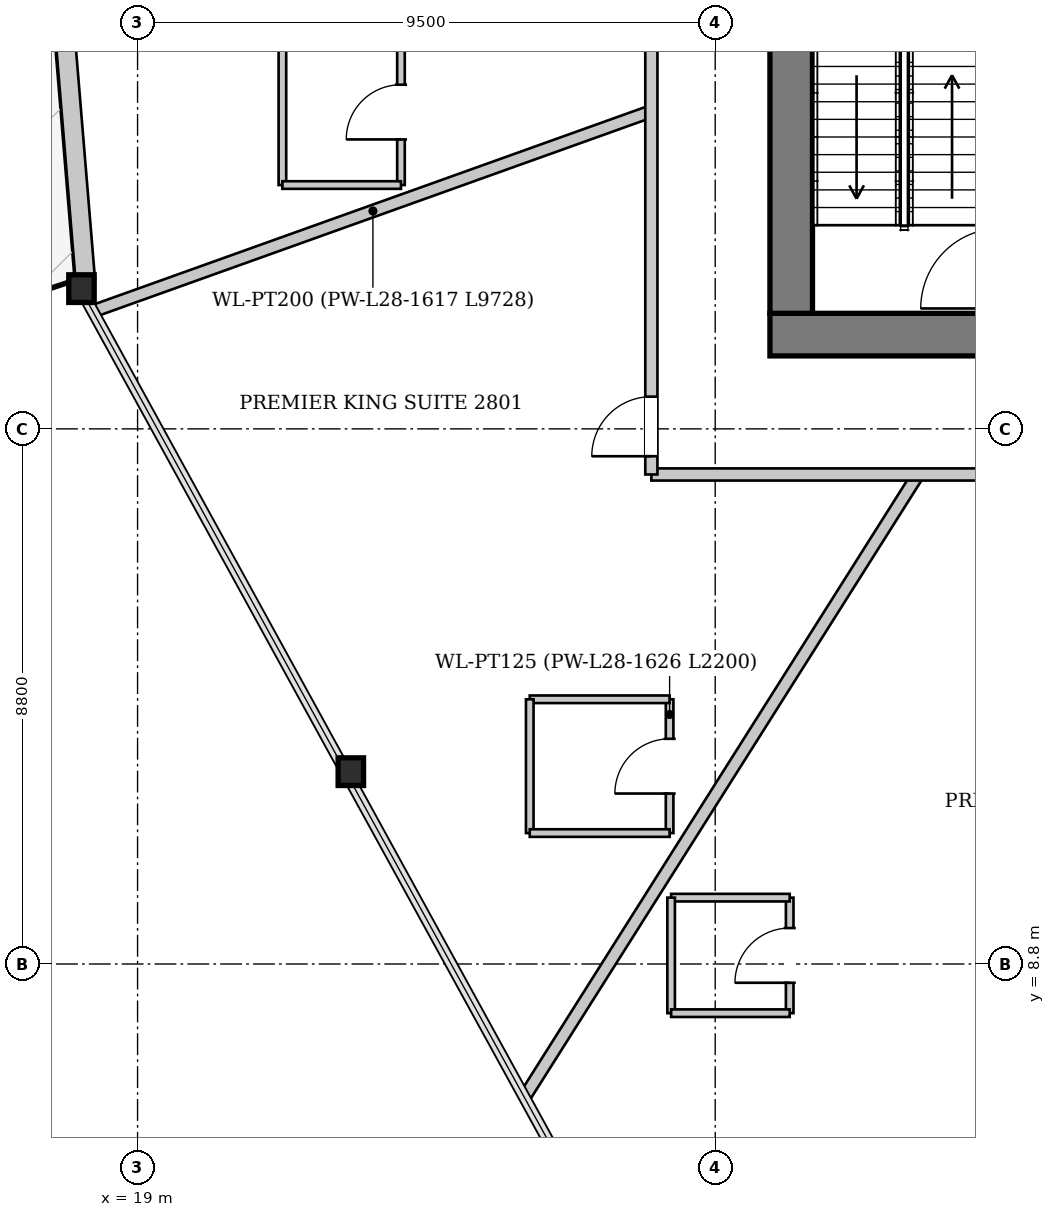
"""IFC4 building model, lengths in metres.
Left out: names, types, materials, properties, quantities, classifications, styles, units other than length and angle.
Written with IfcOpenShell. Run it as: python <this file> out.ifc"""

import sys

from ifc_helpers import new_model, si_unit, direction, frame, frame_2d, origin, origin_2d, place, context, subcontext, project, spatial, rectangle, i_section, extrude, source, transform, mapped, element, fill, save


model = new_model("IFC4")
c1 = context("Model", 3, precision=1e-05, world=origin(), true_north=direction((0.0, 1.0)))
c2 = subcontext(c1, "Body", "Model", "MODEL_VIEW")
j1 = project(units=[si_unit("LENGTHUNIT", "METRE"), si_unit("PLANEANGLEUNIT", "RADIAN")], contexts=[c1])
p1 = place(None, origin())
s1 = spatial("IfcSite", under=j1, at=p1, CompositionType="ELEMENT")
p2 = place(p1, origin())
s2 = spatial("IfcBuilding", under=s1, at=p2, CompositionType="ELEMENT")
p3 = place(p2, frame((0.0, 0.0, 109.25)))
s3 = spatial("IfcBuildingStorey", under=s2, at=p3, CompositionType="ELEMENT", Elevation=109.25)
m1 = source(origin(), c2, "Body", "SweptSolid", [
    extrude(i_section(OverallWidth=0.418, OverallDepth=0.455, WebThickness=0.038, FlangeThickness=0.059, at=origin_2d()), origin(), (0.0, 0.0, 1.0), 3.403),
])
p4 = place(p3, frame((17.98, 20.048, 0.0), z_axis=(0.057259482904, -0.083449597264, 0.994865577017), x_axis=(0.824558750738, 0.565776339715, 0.0)))
e1 = element("IfcColumn", 1, at=p4, inside=s3, PredefinedType="COLUMN", context=c2, shape_type="MappedRepresentation", body=[
    mapped(m1, transform((0.0, 0.0, 0.0), x_axis=(1.0, 0.0, 0.0), y_axis=(0.0, 1.0, 0.0), z_axis=(0.0, 0.0, 1.0), scale=1.0)),
])
m2 = source(origin(), c2, "Body", "SweptSolid", [
    extrude(i_section(OverallWidth=0.418, OverallDepth=0.455, WebThickness=0.038, FlangeThickness=0.059, at=origin_2d()), origin(), (0.0, 0.0, 1.0), 3.405),
])
p5 = place(p3, frame((22.361, 12.071, 0.0), z_axis=(0.086336223989, -0.063676550583, 0.994229024588), x_axis=(0.593563792258, 0.804786943557, 0.0)))
e2 = element("IfcColumn", 2, at=p5, inside=s3, PredefinedType="COLUMN", context=c2, shape_type="MappedRepresentation", body=[
    mapped(m2, transform((0.0, 0.0, 0.0), x_axis=(1.0, 0.0, 0.0), y_axis=(0.0, 1.0, 0.0), z_axis=(0.0, 0.0, 1.0), scale=1.0)),
])
p6 = place(p3, frame((51.917, 15.746, 0.0), z_axis=(0.0, 0.0, 1.0), x_axis=(-0.841105279502, -0.540871434626, 0.0)))
e3 = element("IfcWall", 3, at=p6, inside=s3, PredefinedType="SOLIDWALL", context=c2, shape_type="SweptSolid", body=[
    extrude(rectangle(XDim=23.953, YDim=0.32, at=frame_2d((11.976, 0.0))), origin(), (0.0, 0.0, 1.0), 2.692),
])
p7 = place(p6, frame((7.115, 0.0, 0.0)))
e4 = element("IfcOpeningElement", 4, at=p7, cuts=e3, PredefinedType="OPENING", context=c2, shape_type="SweptSolid", body=[
    extrude(rectangle(XDim=1.1, YDim=2.3, at=frame_2d((0.55, 1.15))), frame((0.0, 0.17, 0.0), z_axis=(0.0, -1.0, 0.0), x_axis=(1.0, 0.0, 0.0)), (0.0, 0.0, 1.0), 0.34),
])
p8 = place(p6, frame((16.825, 0.0, 0.372)))
e5 = element("IfcOpeningElement", 5, at=p8, cuts=e3, PredefinedType="OPENING", context=c2, shape_type="SweptSolid", body=[
    extrude(rectangle(XDim=1.8, YDim=2.2, at=frame_2d((0.9, 1.1))), frame((0.0, 0.17, 0.0), z_axis=(0.0, -1.0, 0.0), x_axis=(1.0, 0.0, 0.0)), (0.0, 0.0, 1.0), 0.34),
])
p9 = place(p3, frame((18.139, 20.062, 0.0), z_axis=(0.0, 0.0, 1.0), x_axis=(-0.082462696948, 0.996594151905, 0.0)))
e6 = element("IfcWall", 6, at=p9, inside=s3, PredefinedType="SOLIDWALL", context=c2, shape_type="SweptSolid", body=[
    extrude(rectangle(XDim=18.202, YDim=0.32, at=frame_2d((9.101, 0.0))), origin(), (0.0, 0.0, 1.0), 2.692),
])
p10 = place(p9, frame((5.275, 0.0, 0.0)))
e7 = element("IfcOpeningElement", 7, at=p10, cuts=e6, PredefinedType="OPENING", context=c2, shape_type="SweptSolid", body=[
    extrude(rectangle(XDim=1.1, YDim=2.3, at=frame_2d((0.55, 1.15))), frame((0.0, 0.17, 0.0), z_axis=(0.0, -1.0, 0.0), x_axis=(1.0, 0.0, 0.0)), (0.0, 0.0, 1.0), 0.34),
])
p11 = place(p9, frame((12.569, 0.0, 0.372)))
e8 = element("IfcOpeningElement", 8, at=p11, cuts=e6, PredefinedType="OPENING", context=c2, shape_type="SweptSolid", body=[
    extrude(rectangle(XDim=1.8, YDim=2.2, at=frame_2d((0.9, 1.1))), frame((0.0, 0.17, 0.0), z_axis=(0.0, -1.0, 0.0), x_axis=(1.0, 0.0, 0.0)), (0.0, 0.0, 1.0), 0.34),
])
p12 = place(p3, frame((46.6, 19.15, 0.0), z_axis=(0.0, 0.0, 1.0), x_axis=(-1.0, 0.0, 0.0)))
e9 = element("IfcWall", 9, at=p12, inside=s3, PredefinedType="SHEAR", context=c2, shape_type="SweptSolid", body=[
    extrude(rectangle(XDim=17.2, YDim=0.7, at=frame_2d((8.6, 0.0))), origin(), (0.0, 0.0, 1.0), 3.3),
])
p13 = place(p12, frame((4.8, 0.0, 0.0)))
e10 = element("IfcOpeningElement", 10, at=p13, cuts=e9, PredefinedType="OPENING", context=c2, shape_type="SweptSolid", body=[
    extrude(rectangle(XDim=1.12, YDim=2.25, at=frame_2d((0.56, 1.125))), frame((0.0, 0.36, 0.0), z_axis=(0.0, -1.0, 0.0), x_axis=(1.0, 0.0, 0.0)), (0.0, 0.0, 1.0), 0.72),
])
p14 = place(p12, frame((11.3, 0.0, 0.0)))
e11 = element("IfcOpeningElement", 11, at=p14, cuts=e9, PredefinedType="OPENING", context=c2, shape_type="SweptSolid", body=[
    extrude(rectangle(XDim=1.12, YDim=2.25, at=frame_2d((0.56, 1.125))), frame((0.0, 0.36, 0.0), z_axis=(0.0, -1.0, 0.0), x_axis=(1.0, 0.0, 0.0)), (0.0, 0.0, 1.0), 0.72),
])
p15 = place(p3, frame((29.75, 19.5, 0.0), z_axis=(0.0, 0.0, 1.0), x_axis=(0.0, 1.0, 0.0)))
e12 = element("IfcWall", 12, at=p15, inside=s3, PredefinedType="SHEAR", context=c2, shape_type="SweptSolid", body=[
    extrude(rectangle(XDim=14.2, YDim=0.7, at=frame_2d((7.1, 0.0))), origin(), (0.0, 0.0, 1.0), 3.3),
])
p16 = place(p15, frame((7.42, 0.0, 0.0)))
e13 = element("IfcOpeningElement", 13, at=p16, cuts=e12, PredefinedType="OPENING", context=c2, shape_type="SweptSolid", body=[
    extrude(rectangle(XDim=1.6, YDim=2.2, at=frame_2d((0.8, 1.1))), frame((0.0, 0.36, 0.0), z_axis=(0.0, -1.0, 0.0), x_axis=(1.0, 0.0, 0.0)), (0.0, 0.0, 1.0), 0.72),
])
p17 = place(p3, frame((27.45, 22.823, 0.0), z_axis=(0.0, 0.0, 1.0), x_axis=(-0.941467347451, -0.337104188174, 0.0)))
e14 = element("IfcWall", 14, at=p17, inside=s3, PredefinedType="PARTITIONING", context=c2, shape_type="SweptSolid", body=[
    extrude(rectangle(XDim=9.728, YDim=0.2, at=frame_2d((4.864, 0.0))), origin(), (0.0, 0.0, 1.0), 2.785),
])
p18 = place(p3, frame((31.836, 16.85, 0.0), z_axis=(0.0, 0.0, 1.0), x_axis=(-0.534334254855, -0.845273271841, 0.0)))
e15 = element("IfcWall", 15, at=p18, inside=s3, PredefinedType="PARTITIONING", context=c2, shape_type="SweptSolid", body=[
    extrude(rectangle(XDim=12.084, YDim=0.2, at=frame_2d((6.042, 0.0))), origin(), (0.0, 0.0, 1.0), 3.3),
])
p19 = place(p3, frame((27.75, 10.953, 0.0), z_axis=(0.0, 0.0, 1.0), x_axis=(0.0, 1.0, 0.0)))
e16 = element("IfcWall", 16, at=p19, inside=s3, PredefinedType="PARTITIONING", context=c2, shape_type="SweptSolid", body=[
    extrude(rectangle(XDim=2.2, YDim=0.125, at=frame_2d((1.1, 0.0))), origin(), (0.0, 0.0, 1.0), 3.3),
])
p20 = place(p19, frame((0.65, 0.0, 0.0)))
e17 = element("IfcOpeningElement", 17, at=p20, cuts=e16, PredefinedType="OPENING", context=c2, shape_type="SweptSolid", body=[
    extrude(rectangle(XDim=0.9, YDim=2.1, at=frame_2d((0.45, 1.05))), frame((0.0, 0.073, 0.0), z_axis=(0.0, -1.0, 0.0), x_axis=(1.0, 0.0, 0.0)), (0.0, 0.0, 1.0), 0.145),
])
p21 = place(p3, frame((27.75, 13.153, 0.0), z_axis=(0.0, 0.0, 1.0), x_axis=(-1.0, 0.0, 0.0)))
e18 = element("IfcWall", 18, at=p21, inside=s3, PredefinedType="PARTITIONING", context=c2, shape_type="SweptSolid", body=[
    extrude(rectangle(XDim=2.3, YDim=0.125, at=frame_2d((1.15, 0.0))), origin(), (0.0, 0.0, 1.0), 3.3),
])
p22 = place(p3, frame((25.45, 13.153, 0.0), z_axis=(0.0, 0.0, 1.0), x_axis=(0.0, -1.0, 0.0)))
e19 = element("IfcWall", 19, at=p22, inside=s3, PredefinedType="PARTITIONING", context=c2, shape_type="SweptSolid", body=[
    extrude(rectangle(XDim=2.2, YDim=0.125, at=frame_2d((1.1, 0.0))), origin(), (0.0, 0.0, 1.0), 3.3),
])
p23 = place(p3, frame((25.45, 10.953, 0.0), z_axis=(0.0, 0.0, 1.0), x_axis=(1.0, 0.0, 0.0)))
e20 = element("IfcWall", 20, at=p23, inside=s3, PredefinedType="PARTITIONING", context=c2, shape_type="SweptSolid", body=[
    extrude(rectangle(XDim=2.3, YDim=0.125, at=frame_2d((1.15, 0.0))), origin(), (0.0, 0.0, 1.0), 3.3),
])
p24 = place(p3, frame((29.725, 7.991, 0.0), z_axis=(0.0, 0.0, 1.0), x_axis=(0.0, 1.0, 0.0)))
e21 = element("IfcWall", 21, at=p24, inside=s3, PredefinedType="PARTITIONING", context=c2, shape_type="SweptSolid", body=[
    extrude(rectangle(XDim=1.9, YDim=0.125, at=frame_2d((0.95, 0.0))), origin(), (0.0, 0.0, 1.0), 2.795),
])
p25 = place(p24, frame((0.5, 0.0, 0.0)))
e22 = element("IfcOpeningElement", 22, at=p25, cuts=e21, PredefinedType="OPENING", context=c2, shape_type="SweptSolid", body=[
    extrude(rectangle(XDim=0.9, YDim=2.1, at=frame_2d((0.45, 1.05))), frame((0.0, 0.073, 0.0), z_axis=(0.0, -1.0, 0.0), x_axis=(1.0, 0.0, 0.0)), (0.0, 0.0, 1.0), 0.145),
])
p26 = place(p3, frame((29.725, 9.891, 0.0), z_axis=(0.0, 0.0, 1.0), x_axis=(-1.0, 0.0, 0.0)))
e23 = element("IfcWall", 23, at=p26, inside=s3, PredefinedType="PARTITIONING", context=c2, shape_type="SweptSolid", body=[
    extrude(rectangle(XDim=1.95, YDim=0.125, at=frame_2d((0.975, 0.0))), origin(), (0.0, 0.0, 1.0), 3.3),
])
p27 = place(p3, frame((27.775, 9.891, 0.0), z_axis=(0.0, 0.0, 1.0), x_axis=(0.0, -1.0, 0.0)))
e24 = element("IfcWall", 24, at=p27, inside=s3, PredefinedType="PARTITIONING", context=c2, shape_type="SweptSolid", body=[
    extrude(rectangle(XDim=1.9, YDim=0.125, at=frame_2d((0.95, 0.0))), origin(), (0.0, 0.0, 1.0), 3.3),
])
p28 = place(p3, frame((27.775, 7.991, 0.0), z_axis=(0.0, 0.0, 1.0), x_axis=(1.0, 0.0, 0.0)))
e25 = element("IfcWall", 25, at=p28, inside=s3, PredefinedType="PARTITIONING", context=c2, shape_type="SweptSolid", body=[
    extrude(rectangle(XDim=1.95, YDim=0.125, at=frame_2d((0.975, 0.0))), origin(), (0.0, 0.0, 1.0), 3.3),
])
p29 = place(p3, frame((23.332, 21.61, 0.0), z_axis=(0.0, 0.0, 1.0), x_axis=(0.0, 1.0, 0.0)))
e26 = element("IfcWall", 26, at=p29, inside=s3, PredefinedType="PARTITIONING", context=c2, shape_type="SweptSolid", body=[
    extrude(rectangle(XDim=2.4, YDim=0.125, at=frame_2d((1.2, 0.0))), origin(), (0.0, 0.0, 1.0), 3.3),
])
p30 = place(p29, frame((0.75, 0.0, 0.0)))
e27 = element("IfcOpeningElement", 27, at=p30, cuts=e26, PredefinedType="OPENING", context=c2, shape_type="SweptSolid", body=[
    extrude(rectangle(XDim=0.9, YDim=2.1, at=frame_2d((0.45, 1.05))), frame((0.0, 0.073, 0.0), z_axis=(0.0, -1.0, 0.0), x_axis=(1.0, 0.0, 0.0)), (0.0, 0.0, 1.0), 0.145),
])
p31 = place(p3, frame((21.382, 24.01, 0.0), z_axis=(0.0, 0.0, 1.0), x_axis=(0.0, -1.0, 0.0)))
e28 = element("IfcWall", 28, at=p31, inside=s3, PredefinedType="PARTITIONING", context=c2, shape_type="SweptSolid", body=[
    extrude(rectangle(XDim=2.4, YDim=0.125, at=frame_2d((1.2, 0.0))), origin(), (0.0, 0.0, 1.0), 3.3),
])
p32 = place(p3, frame((21.382, 21.61, 0.0), z_axis=(0.0, 0.0, 1.0), x_axis=(1.0, 0.0, 0.0)))
e29 = element("IfcWall", 29, at=p32, inside=s3, PredefinedType="PARTITIONING", context=c2, shape_type="SweptSolid", body=[
    extrude(rectangle(XDim=1.95, YDim=0.125, at=frame_2d((0.975, 0.0))), origin(), (0.0, 0.0, 1.0), 2.785),
])
p33 = place(p3, frame((27.45, 16.85, 0.0), z_axis=(0.0, 0.0, 1.0), x_axis=(1.0, 0.0, 0.0)))
e30 = element("IfcWall", 30, at=p33, inside=s3, PredefinedType="PARTITIONING", context=c2, shape_type="SweptSolid", body=[
    extrude(rectangle(XDim=21.1, YDim=0.2, at=frame_2d((10.55, 0.0))), origin(), (0.0, 0.0, 1.0), 2.925),
])
p34 = place(p33, frame((6.839, 0.0, 0.0)))
e31 = element("IfcOpeningElement", 31, at=p34, cuts=e30, PredefinedType="OPENING", context=c2, shape_type="SweptSolid", body=[
    extrude(rectangle(XDim=0.98, YDim=2.15, at=frame_2d((0.49, 1.075))), frame((0.0, 0.11, 0.0), z_axis=(0.0, -1.0, 0.0), x_axis=(1.0, 0.0, 0.0)), (0.0, 0.0, 1.0), 0.22),
])
p35 = place(p33, frame((16.6, 0.0, 0.0)))
e32 = element("IfcOpeningElement", 32, at=p35, cuts=e30, PredefinedType="OPENING", context=c2, shape_type="SweptSolid", body=[
    extrude(rectangle(XDim=0.98, YDim=2.15, at=frame_2d((0.49, 1.075))), frame((0.0, 0.11, 0.0), z_axis=(0.0, -1.0, 0.0), x_axis=(1.0, 0.0, 0.0)), (0.0, 0.0, 1.0), 0.22),
])
p36 = place(p3, frame((27.45, 16.85, 0.0), z_axis=(0.0, 0.0, 1.0), x_axis=(0.0, 1.0, 0.0)))
e33 = element("IfcWall", 33, at=p36, inside=s3, PredefinedType="PARTITIONING", context=c2, shape_type="SweptSolid", body=[
    extrude(rectangle(XDim=19.5, YDim=0.2, at=frame_2d((9.75, 0.0))), origin(), (0.0, 0.0, 1.0), 3.3),
])
p37 = place(p36, frame((0.3, 0.0, 0.0)))
e34 = element("IfcOpeningElement", 34, at=p37, cuts=e33, PredefinedType="OPENING", context=c2, shape_type="SweptSolid", body=[
    extrude(rectangle(XDim=0.98, YDim=2.15, at=frame_2d((0.49, 1.075))), frame((0.0, 0.11, 0.0), z_axis=(0.0, -1.0, 0.0), x_axis=(1.0, 0.0, 0.0)), (0.0, 0.0, 1.0), 0.22),
])
p38 = place(p36, frame((16.768, 0.0, 0.0)))
e35 = element("IfcOpeningElement", 35, at=p38, cuts=e33, PredefinedType="OPENING", context=c2, shape_type="SweptSolid", body=[
    extrude(rectangle(XDim=0.98, YDim=2.15, at=frame_2d((0.49, 1.075))), frame((0.0, 0.11, 0.0), z_axis=(0.0, -1.0, 0.0), x_axis=(1.0, 0.0, 0.0)), (0.0, 0.0, 1.0), 0.22),
])
p39 = place(p36, frame((9.362, 0.0, 0.0)))
e36 = element("IfcOpeningElement", 36, at=p39, cuts=e33, PredefinedType="OPENING", context=c2, shape_type="SweptSolid", body=[
    extrude(rectangle(XDim=0.98, YDim=2.15, at=frame_2d((0.49, 1.075))), frame((0.0, 0.11, 0.0), z_axis=(0.0, -1.0, 0.0), x_axis=(1.0, 0.0, 0.0)), (0.0, 0.0, 1.0), 0.22),
])
m3 = source(origin(), c2, "Body", "SweptSolid", [
    extrude(rectangle(XDim=0.9, YDim=2.1, at=frame_2d((0.45, 1.05))), frame((0.0, 0.025, 0.0), z_axis=(0.0, -1.0, 0.0), x_axis=(1.0, 0.0, 0.0)), (0.0, 0.0, 1.0), 0.05),
])
p40 = place(p20, origin())
e37 = element("IfcDoor", 37, at=p40, inside=s3, OperationType="SINGLE_SWING_LEFT", PredefinedType="DOOR", context=c2, shape_type="MappedRepresentation", body=[
    mapped(m3, transform((0.0, 0.0, 0.0), x_axis=(1.0, 0.0, 0.0), y_axis=(0.0, 1.0, 0.0), z_axis=(0.0, 0.0, 1.0), scale=1.0)),
])
fill(e17, e37)
p41 = place(p25, origin())
e38 = element("IfcDoor", 38, at=p41, inside=s3, OperationType="SINGLE_SWING_LEFT", PredefinedType="DOOR", context=c2, shape_type="MappedRepresentation", body=[
    mapped(m3, transform((0.0, 0.0, 0.0), x_axis=(1.0, 0.0, 0.0), y_axis=(0.0, 1.0, 0.0), z_axis=(0.0, 0.0, 1.0), scale=1.0)),
])
fill(e22, e38)
p42 = place(p30, origin())
e39 = element("IfcDoor", 39, at=p42, inside=s3, OperationType="SINGLE_SWING_LEFT", PredefinedType="DOOR", context=c2, shape_type="MappedRepresentation", body=[
    mapped(m3, transform((0.0, 0.0, 0.0), x_axis=(1.0, 0.0, 0.0), y_axis=(0.0, 1.0, 0.0), z_axis=(0.0, 0.0, 1.0), scale=1.0)),
])
fill(e27, e39)
m4 = source(origin(), c2, "Body", "SweptSolid", [
    extrude(rectangle(XDim=0.98, YDim=2.15, at=frame_2d((0.49, 1.075))), frame((0.0, 0.025, 0.0), z_axis=(0.0, -1.0, 0.0), x_axis=(1.0, 0.0, 0.0)), (0.0, 0.0, 1.0), 0.05),
])
p43 = place(p37, origin())
e40 = element("IfcDoor", 40, at=p43, inside=s3, OperationType="SINGLE_SWING_LEFT", PredefinedType="DOOR", context=c2, shape_type="MappedRepresentation", body=[
    mapped(m4, transform((0.0, 0.0, 0.0), x_axis=(1.0, 0.0, 0.0), y_axis=(0.0, 1.0, 0.0), z_axis=(0.0, 0.0, 1.0), scale=1.0)),
])
fill(e34, e40)
save(model, sys.argv[1])
